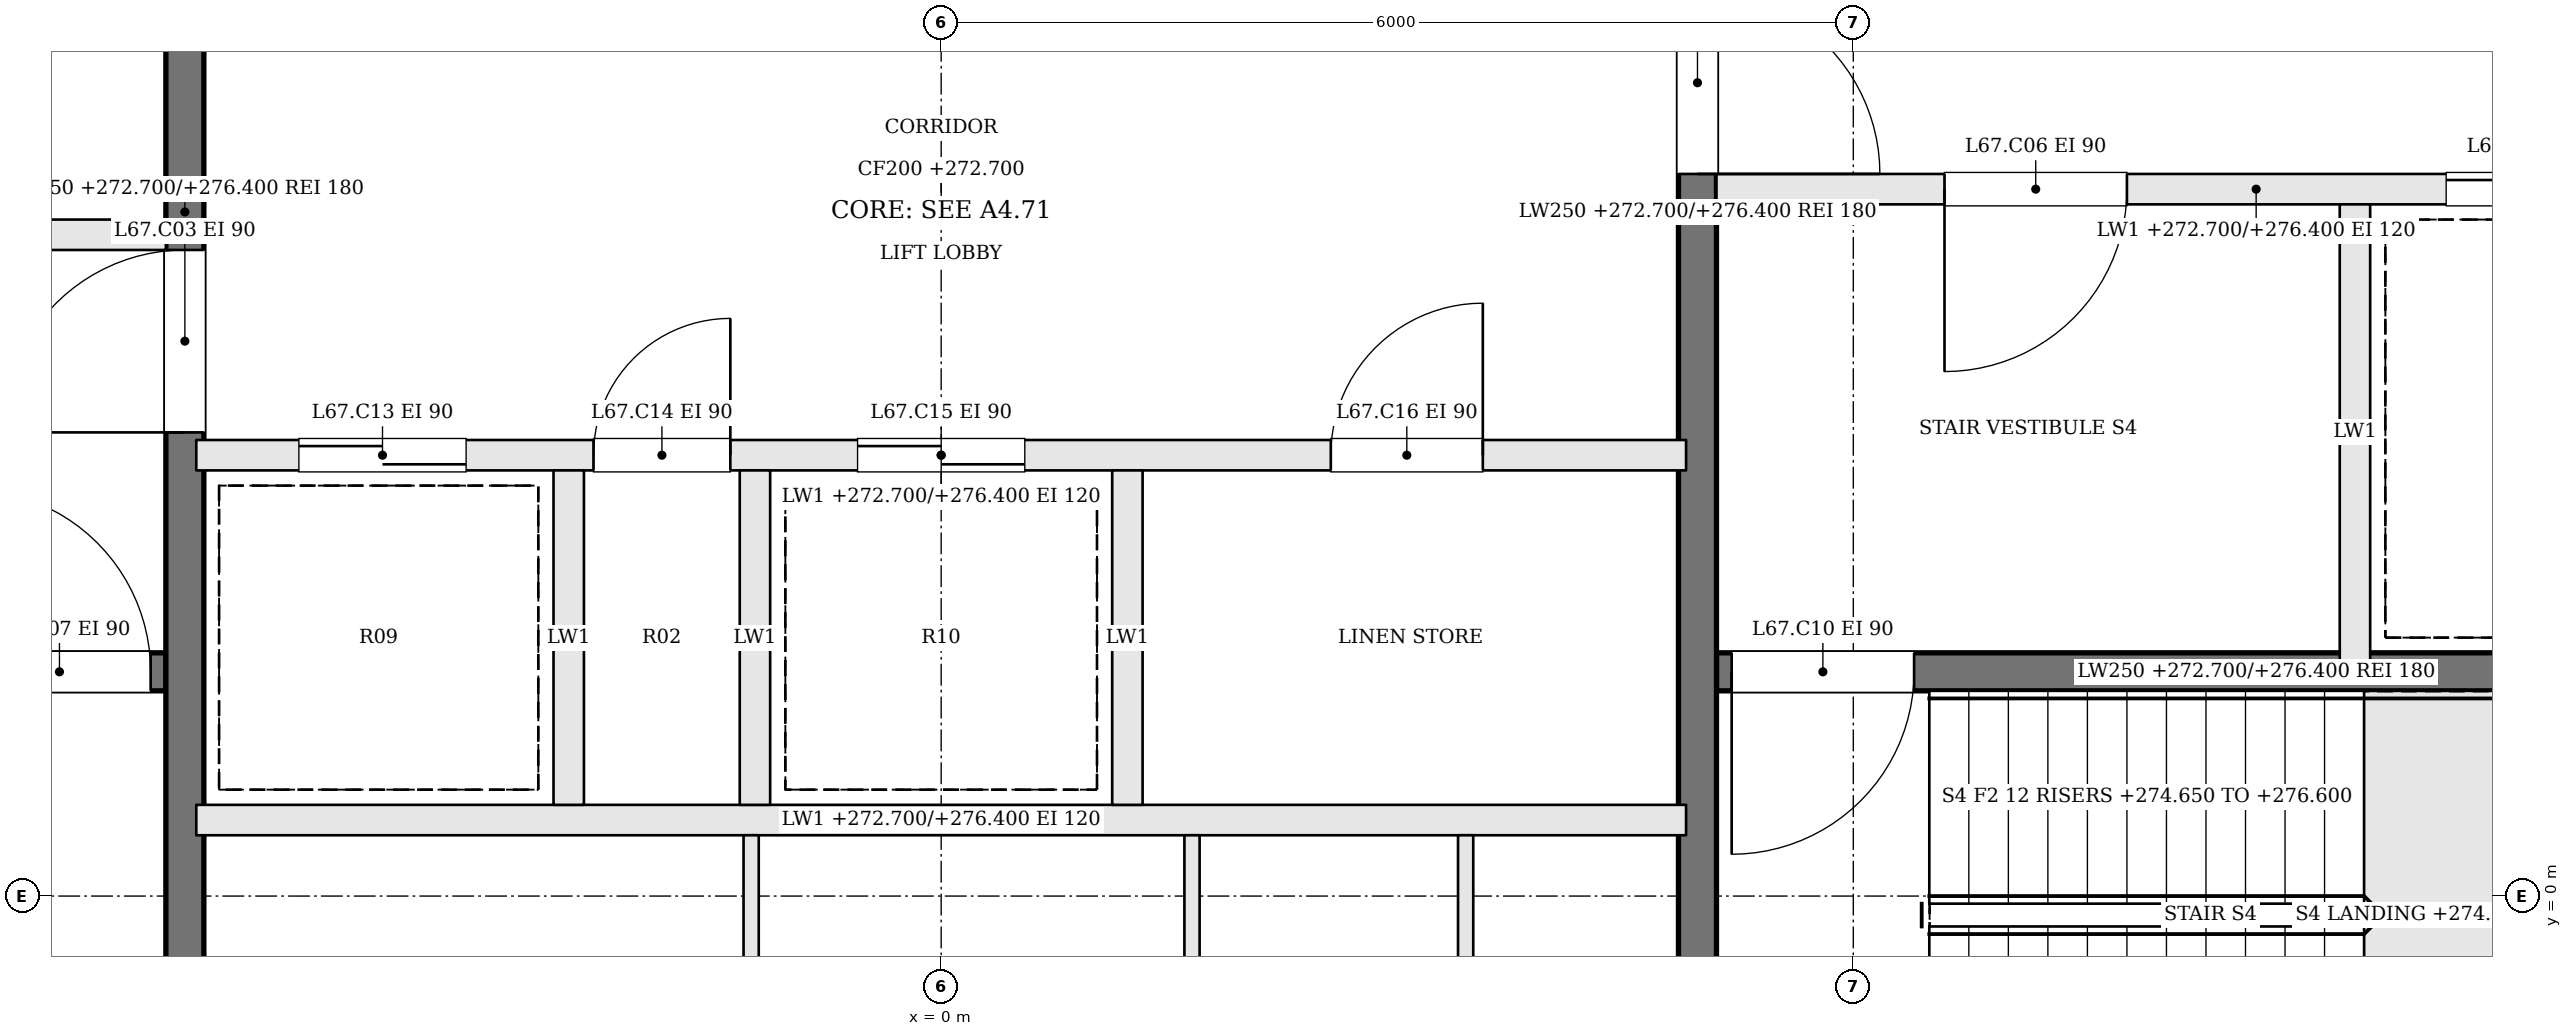
"""IFC4 building model, lengths in metres.
Left out: names, types, materials, properties, quantities, classifications, styles, units other than length and angle.
Written with IfcOpenShell. Run it as: python <this file> out.ifc"""

import sys

from ifc_helpers import new_model, si_unit, direction, frame, frame_2d, origin, place, context, subcontext, project, spatial, rectangle, extrude, element, fill, save


model = new_model("IFC4")
c1 = context("Model", 3, precision=1e-05, world=origin(), true_north=direction((0.0, 1.0)))
c2 = subcontext(c1, "Body", "Model", "MODEL_VIEW")
j1 = project(units=[si_unit("LENGTHUNIT", "METRE"), si_unit("PLANEANGLEUNIT", "RADIAN")], contexts=[c1])
p1 = place(None, origin())
s1 = spatial("IfcSite", under=j1, at=p1, CompositionType="ELEMENT")
p2 = place(p1, origin())
s2 = spatial("IfcBuilding", under=s1, at=p2, CompositionType="ELEMENT")
p3 = place(p2, frame((0.0, 0.0, 272.7)))
s3 = spatial("IfcBuildingStorey", under=s2, at=p3, CompositionType="ELEMENT", Elevation=272.7)
p4 = place(p3, frame((-12.2, 1.475, 0.0), z_axis=(0.0, 0.0, 1.0), x_axis=(1.0, 0.0, 0.0)))
e1 = element("IfcWall", 1, at=p4, inside=s3, PredefinedType="SOLIDWALL", context=c2, shape_type="SweptSolid", body=[
    extrude(rectangle(XDim=7.1, YDim=0.25, at=frame_2d((3.55, 0.0))), origin(), (0.0, 0.0, 1.0), 3.7),
])
p5 = place(p4, frame((5.8, 0.0, 0.0)))
e2 = element("IfcOpeningElement", 2, at=p5, cuts=e1, PredefinedType="OPENING", context=c2, shape_type="SweptSolid", body=[
    extrude(rectangle(XDim=1.2, YDim=2.1, at=frame_2d((0.6, 1.05))), frame((0.0, 0.135, 0.0), z_axis=(0.0, -1.0, 0.0), x_axis=(1.0, 0.0, 0.0)), (0.0, 0.0, 1.0), 0.27),
])
p6 = place(p3, frame((-12.2, 4.35, 0.0), z_axis=(0.0, 0.0, 1.0), x_axis=(1.0, 0.0, 0.0)))
e3 = element("IfcWall", 3, at=p6, inside=s3, PredefinedType="SOLIDWALL", context=c2, shape_type="SweptSolid", body=[
    extrude(rectangle(XDim=7.1, YDim=0.2, at=frame_2d((3.55, 0.0))), origin(), (0.0, 0.0, 1.0), 3.7),
])
p7 = place(p6, frame((4.4, 0.0, 0.0)))
e4 = element("IfcOpeningElement", 4, at=p7, cuts=e3, PredefinedType="OPENING", context=c2, shape_type="SweptSolid", body=[
    extrude(rectangle(XDim=1.2, YDim=2.1, at=frame_2d((0.6, 1.05))), frame((0.0, 0.11, 0.0), z_axis=(0.0, -1.0, 0.0), x_axis=(1.0, 0.0, 0.0)), (0.0, 0.0, 1.0), 0.22),
])
p8 = place(p6, frame((1.1, 0.0, 0.0)))
e5 = element("IfcOpeningElement", 5, at=p8, cuts=e3, PredefinedType="OPENING", context=c2, shape_type="SweptSolid", body=[
    extrude(rectangle(XDim=1.2, YDim=2.1, at=frame_2d((0.6, 1.05))), frame((0.0, 0.11, 0.0), z_axis=(0.0, -1.0, 0.0), x_axis=(1.0, 0.0, 0.0)), (0.0, 0.0, 1.0), 0.22),
])
p9 = place(p3, frame((12.2, 4.65, 0.0), z_axis=(0.0, 0.0, 1.0), x_axis=(-1.0, 0.0, 0.0)))
e6 = element("IfcWall", 6, at=p9, inside=s3, PredefinedType="SOLIDWALL", context=c2, shape_type="SweptSolid", body=[
    extrude(rectangle(XDim=7.1, YDim=0.2, at=frame_2d((3.55, 0.0))), origin(), (0.0, 0.0, 1.0), 3.7),
])
p10 = place(p9, frame((4.4, 0.0, 0.0)))
e7 = element("IfcOpeningElement", 7, at=p10, cuts=e6, PredefinedType="OPENING", context=c2, shape_type="SweptSolid", body=[
    extrude(rectangle(XDim=1.2, YDim=2.1, at=frame_2d((0.6, 1.05))), frame((0.0, 0.11, 0.0), z_axis=(0.0, -1.0, 0.0), x_axis=(1.0, 0.0, 0.0)), (0.0, 0.0, 1.0), 0.22),
])
p11 = place(p9, frame((1.1, 0.0, 0.0)))
e8 = element("IfcOpeningElement", 8, at=p11, cuts=e6, PredefinedType="OPENING", context=c2, shape_type="SweptSolid", body=[
    extrude(rectangle(XDim=1.2, YDim=2.1, at=frame_2d((0.6, 1.05))), frame((0.0, 0.11, 0.0), z_axis=(0.0, -1.0, 0.0), x_axis=(1.0, 0.0, 0.0)), (0.0, 0.0, 1.0), 0.22),
])
p12 = place(p3, frame((12.2, 1.475, 0.0), z_axis=(0.0, 0.0, 1.0), x_axis=(-1.0, 0.0, 0.0)))
e9 = element("IfcWall", 9, at=p12, inside=s3, PredefinedType="SOLIDWALL", context=c2, shape_type="SweptSolid", body=[
    extrude(rectangle(XDim=7.1, YDim=0.25, at=frame_2d((3.55, 0.0))), origin(), (0.0, 0.0, 1.0), 3.7),
])
p13 = place(p12, frame((5.8, 0.0, 0.0)))
e10 = element("IfcOpeningElement", 10, at=p13, cuts=e9, PredefinedType="OPENING", context=c2, shape_type="SweptSolid", body=[
    extrude(rectangle(XDim=1.2, YDim=2.1, at=frame_2d((0.6, 1.05))), frame((0.0, 0.135, 0.0), z_axis=(0.0, -1.0, 0.0), x_axis=(1.0, 0.0, 0.0)), (0.0, 0.0, 1.0), 0.27),
])
p14 = place(p3, frame((9.3, 4.55, 0.0), z_axis=(0.0, 0.0, 1.0), x_axis=(0.0, -1.0, 0.0)))
e11 = element("IfcWall", 11, at=p14, inside=s3, PredefinedType="SOLIDWALL", context=c2, shape_type="SweptSolid", body=[
    extrude(rectangle(XDim=3.0, YDim=0.2, at=frame_2d((1.5, 0.0))), origin(), (0.0, 0.0, 1.0), 3.7),
])
p15 = place(p3, frame((-4.975, -2.2, 0.0), z_axis=(0.0, 0.0, 1.0), x_axis=(0.0, 1.0, 0.0)))
e12 = element("IfcWall", 12, at=p15, inside=s3, PredefinedType="SOLIDWALL", context=c2, shape_type="SweptSolid", body=[
    extrude(rectangle(XDim=13.4, YDim=0.25, at=frame_2d((6.7, 0.0))), origin(), (0.0, 0.0, 1.0), 3.7),
])
p16 = place(p15, frame((5.25, 0.0, 0.0)))
e13 = element("IfcOpeningElement", 13, at=p16, cuts=e12, PredefinedType="OPENING", context=c2, shape_type="SweptSolid", body=[
    extrude(rectangle(XDim=1.2, YDim=2.1, at=frame_2d((0.6, 1.05))), frame((0.0, 0.135, 0.0), z_axis=(0.0, -1.0, 0.0), x_axis=(1.0, 0.0, 0.0)), (0.0, 0.0, 1.0), 0.27),
])
p17 = place(p3, frame((4.975, 11.2, 0.0), z_axis=(0.0, 0.0, 1.0), x_axis=(0.0, -1.0, 0.0)))
e14 = element("IfcWall", 14, at=p17, inside=s3, PredefinedType="SOLIDWALL", context=c2, shape_type="SweptSolid", body=[
    extrude(rectangle(XDim=13.4, YDim=0.25, at=frame_2d((6.7, 0.0))), origin(), (0.0, 0.0, 1.0), 3.7),
])
p18 = place(p17, frame((5.25, 0.0, 0.0)))
e15 = element("IfcOpeningElement", 15, at=p18, cuts=e14, PredefinedType="OPENING", context=c2, shape_type="SweptSolid", body=[
    extrude(rectangle(XDim=1.2, YDim=2.1, at=frame_2d((0.6, 1.05))), frame((0.0, 0.135, 0.0), z_axis=(0.0, -1.0, 0.0), x_axis=(1.0, 0.0, 0.0)), (0.0, 0.0, 1.0), 0.27),
])
p19 = place(p3, frame((-4.9, 0.5, 0.0), z_axis=(0.0, 0.0, 1.0), x_axis=(1.0, 0.0, 0.0)))
e16 = element("IfcWall", 16, at=p19, inside=s3, PredefinedType="SOLIDWALL", context=c2, shape_type="SweptSolid", body=[
    extrude(rectangle(XDim=9.8, YDim=0.2, at=frame_2d((4.9, 0.0))), origin(), (0.0, 0.0, 1.0), 3.7),
])
p20 = place(p3, frame((-4.9, 2.9, 0.0), z_axis=(0.0, 0.0, 1.0), x_axis=(1.0, 0.0, 0.0)))
e17 = element("IfcWall", 17, at=p20, inside=s3, PredefinedType="SOLIDWALL", context=c2, shape_type="SweptSolid", body=[
    extrude(rectangle(XDim=9.8, YDim=0.2, at=frame_2d((4.9, 0.0))), origin(), (0.0, 0.0, 1.0), 3.7),
])
p21 = place(p20, frame((0.675, 0.0, 0.0)))
e18 = element("IfcOpeningElement", 18, at=p21, cuts=e17, PredefinedType="OPENING", context=c2, shape_type="SweptSolid", body=[
    extrude(rectangle(XDim=1.1, YDim=2.1, at=frame_2d((0.55, 1.05))), frame((0.0, 0.11, 0.0), z_axis=(0.0, -1.0, 0.0), x_axis=(1.0, 0.0, 0.0)), (0.0, 0.0, 1.0), 0.22),
])
p22 = place(p20, frame((2.613, 0.0, 0.0)))
e19 = element("IfcOpeningElement", 19, at=p22, cuts=e17, PredefinedType="OPENING", context=c2, shape_type="SweptSolid", body=[
    extrude(rectangle(XDim=0.9, YDim=2.1, at=frame_2d((0.45, 1.05))), frame((0.0, 0.11, 0.0), z_axis=(0.0, -1.0, 0.0), x_axis=(1.0, 0.0, 0.0)), (0.0, 0.0, 1.0), 0.22),
])
p23 = place(p20, frame((4.35, 0.0, 0.0)))
e20 = element("IfcOpeningElement", 20, at=p23, cuts=e17, PredefinedType="OPENING", context=c2, shape_type="SweptSolid", body=[
    extrude(rectangle(XDim=1.1, YDim=2.1, at=frame_2d((0.55, 1.05))), frame((0.0, 0.11, 0.0), z_axis=(0.0, -1.0, 0.0), x_axis=(1.0, 0.0, 0.0)), (0.0, 0.0, 1.0), 0.22),
])
p24 = place(p20, frame((7.463, 0.0, 0.0)))
e21 = element("IfcOpeningElement", 21, at=p24, cuts=e17, PredefinedType="OPENING", context=c2, shape_type="SweptSolid", body=[
    extrude(rectangle(XDim=1.0, YDim=2.1, at=frame_2d((0.5, 1.05))), frame((0.0, 0.11, 0.0), z_axis=(0.0, -1.0, 0.0), x_axis=(1.0, 0.0, 0.0)), (0.0, 0.0, 1.0), 0.22),
])
for number, where, z_axis, x_axis in (
    (22, (-2.45, 0.6, 0.0), (0.0, 0.0, 1.0), (0.0, 1.0, 0.0)),
    (23, (-1.225, 0.6, 0.0), (0.0, 0.0, 1.0), (0.0, 1.0, 0.0)),
    (24, (1.225, 0.6, 0.0), (0.0, 0.0, 1.0), (0.0, 1.0, 0.0)),
):
    element("IfcWall", number, at=place(p3, frame(where, z_axis=z_axis, x_axis=x_axis)), inside=s3, PredefinedType="SOLIDWALL", context=c2, shape_type="SweptSolid", body=[
        extrude(rectangle(XDim=2.2, YDim=0.2, at=frame_2d((1.1, 0.0))), origin(), (0.0, 0.0, 1.0), 3.7),
    ])
for number, where, z_axis, x_axis in (
    (25, (-1.25, -2.2, 0.0), (0.0, 0.0, 1.0), (0.0, 1.0, 0.0)),
    (26, (1.65, -2.2, 0.0), (0.0, 0.0, 1.0), (0.0, 1.0, 0.0)),
    (27, (3.45, -2.2, 0.0), (0.0, 0.0, 1.0), (0.0, 1.0, 0.0)),
):
    element("IfcWall", number, at=place(p3, frame(where, z_axis=z_axis, x_axis=x_axis)), inside=s3, PredefinedType="PARTITIONING", context=c2, shape_type="SweptSolid", body=[
        extrude(rectangle(XDim=2.6, YDim=0.1, at=frame_2d((1.3, 0.0))), origin(), (0.0, 0.0, 1.0), 3.7),
    ])
p25 = place(p16, origin())
e28 = element("IfcDoor", 28, at=p25, inside=s3, OperationType="SINGLE_SWING_LEFT", PredefinedType="DOOR", context=c2, shape_type="SweptSolid", body=[
    extrude(rectangle(XDim=1.2, YDim=2.1, at=frame_2d((0.6, 1.05))), frame((0.0, 0.025, 0.0), z_axis=(0.0, -1.0, 0.0), x_axis=(1.0, 0.0, 0.0)), (0.0, 0.0, 1.0), 0.05),
])
fill(e13, e28)
p26 = place(p18, origin())
e29 = element("IfcDoor", 29, at=p26, inside=s3, OperationType="SINGLE_SWING_RIGHT", PredefinedType="DOOR", context=c2, shape_type="SweptSolid", body=[
    extrude(rectangle(XDim=1.2, YDim=2.1, at=frame_2d((0.6, 1.05))), frame((0.0, 0.025, 0.0), z_axis=(0.0, -1.0, 0.0), x_axis=(1.0, 0.0, 0.0)), (0.0, 0.0, 1.0), 0.05),
])
fill(e15, e29)
p27 = place(p10, origin())
e30 = element("IfcDoor", 30, at=p27, inside=s3, OperationType="SINGLE_SWING_RIGHT", PredefinedType="DOOR", context=c2, shape_type="SweptSolid", body=[
    extrude(rectangle(XDim=1.2, YDim=2.1, at=frame_2d((0.6, 1.05))), frame((0.0, 0.025, 0.0), z_axis=(0.0, -1.0, 0.0), x_axis=(1.0, 0.0, 0.0)), (0.0, 0.0, 1.0), 0.05),
])
fill(e7, e30)
p28 = place(p5, origin())
e31 = element("IfcDoor", 31, at=p28, inside=s3, OperationType="SINGLE_SWING_LEFT", PredefinedType="DOOR", context=c2, shape_type="SweptSolid", body=[
    extrude(rectangle(XDim=1.2, YDim=2.1, at=frame_2d((0.6, 1.05))), frame((0.0, 0.025, 0.0), z_axis=(0.0, -1.0, 0.0), x_axis=(1.0, 0.0, 0.0)), (0.0, 0.0, 1.0), 0.05),
])
fill(e2, e31)
p29 = place(p13, origin())
e32 = element("IfcDoor", 32, at=p29, inside=s3, OperationType="SINGLE_SWING_RIGHT", PredefinedType="DOOR", context=c2, shape_type="SweptSolid", body=[
    extrude(rectangle(XDim=1.2, YDim=2.1, at=frame_2d((0.6, 1.05))), frame((0.0, 0.025, 0.0), z_axis=(0.0, -1.0, 0.0), x_axis=(1.0, 0.0, 0.0)), (0.0, 0.0, 1.0), 0.05),
])
fill(e10, e32)
p30 = place(p11, origin())
e33 = element("IfcDoor", 33, at=p30, inside=s3, OperationType="SLIDING_TO_RIGHT", PredefinedType="DOOR", context=c2, shape_type="SweptSolid", body=[
    extrude(rectangle(XDim=1.2, YDim=2.1, at=frame_2d((0.6, 1.05))), frame((0.0, 0.025, 0.0), z_axis=(0.0, -1.0, 0.0), x_axis=(1.0, 0.0, 0.0)), (0.0, 0.0, 1.0), 0.05),
])
fill(e8, e33)
p31 = place(p21, origin())
e34 = element("IfcDoor", 34, at=p31, inside=s3, OperationType="SLIDING_TO_RIGHT", PredefinedType="DOOR", context=c2, shape_type="SweptSolid", body=[
    extrude(rectangle(XDim=1.1, YDim=2.1, at=frame_2d((0.55, 1.05))), frame((0.0, 0.025, 0.0), z_axis=(0.0, -1.0, 0.0), x_axis=(1.0, 0.0, 0.0)), (0.0, 0.0, 1.0), 0.05),
])
fill(e18, e34)
p32 = place(p22, origin())
e35 = element("IfcDoor", 35, at=p32, inside=s3, OperationType="SINGLE_SWING_RIGHT", PredefinedType="DOOR", context=c2, shape_type="SweptSolid", body=[
    extrude(rectangle(XDim=0.9, YDim=2.1, at=frame_2d((0.45, 1.05))), frame((0.0, 0.025, 0.0), z_axis=(0.0, -1.0, 0.0), x_axis=(1.0, 0.0, 0.0)), (0.0, 0.0, 1.0), 0.05),
])
fill(e19, e35)
p33 = place(p23, origin())
e36 = element("IfcDoor", 36, at=p33, inside=s3, OperationType="SLIDING_TO_LEFT", PredefinedType="DOOR", context=c2, shape_type="SweptSolid", body=[
    extrude(rectangle(XDim=1.1, YDim=2.1, at=frame_2d((0.55, 1.05))), frame((0.0, 0.025, 0.0), z_axis=(0.0, -1.0, 0.0), x_axis=(1.0, 0.0, 0.0)), (0.0, 0.0, 1.0), 0.05),
])
fill(e20, e36)
p34 = place(p24, origin())
e37 = element("IfcDoor", 37, at=p34, inside=s3, OperationType="SINGLE_SWING_RIGHT", PredefinedType="DOOR", context=c2, shape_type="SweptSolid", body=[
    extrude(rectangle(XDim=1.0, YDim=2.1, at=frame_2d((0.5, 1.05))), frame((0.0, 0.025, 0.0), z_axis=(0.0, -1.0, 0.0), x_axis=(1.0, 0.0, 0.0)), (0.0, 0.0, 1.0), 0.05),
])
fill(e21, e37)
save(model, sys.argv[1])
